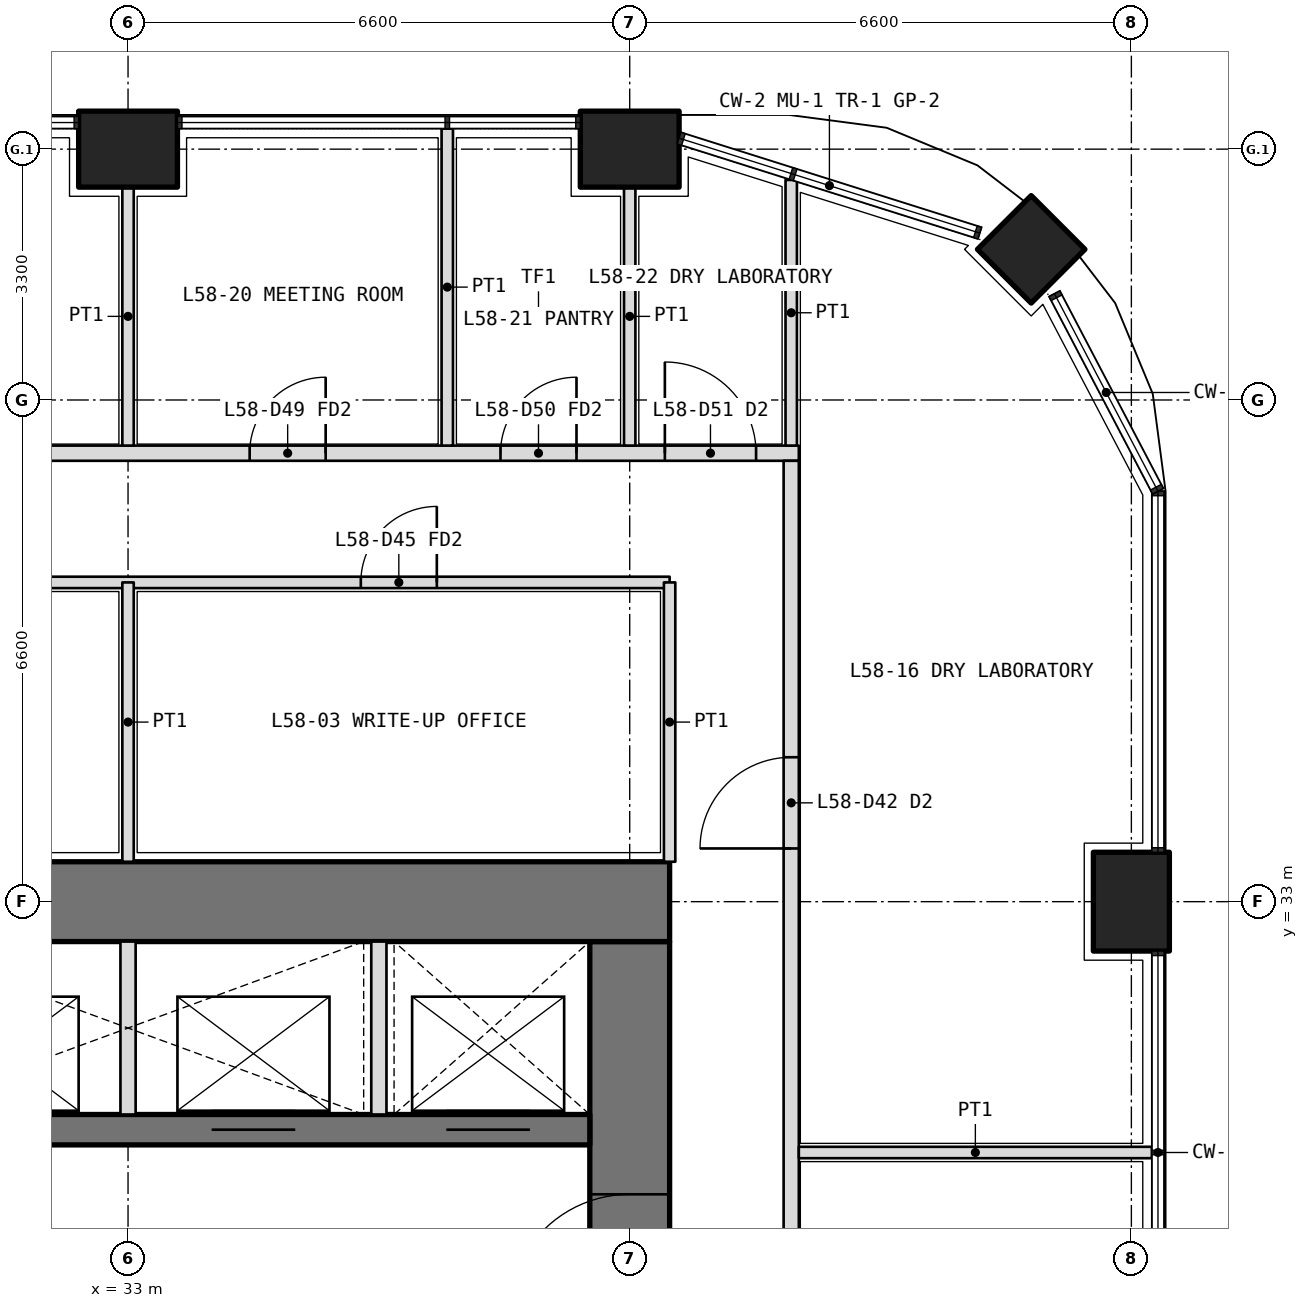
"""IFC4 building model, lengths in metres.
Left out: names, types, materials, properties, quantities, classifications, styles, units other than length and angle.
Written with IfcOpenShell. Run it as: python <this file> out.ifc"""

import sys

from ifc_helpers import new_model, si_unit, direction, frame, frame_2d, origin, origin_2d, place, context, subcontext, project, spatial, rectangle, extrude, element, fill, save


model = new_model("IFC4")
c1 = context("Model", 3, precision=1e-05, world=origin(), true_north=direction((0.0, 1.0)))
c2 = subcontext(c1, "Body", "Model", "MODEL_VIEW")
j1 = project(units=[si_unit("LENGTHUNIT", "METRE"), si_unit("PLANEANGLEUNIT", "RADIAN")], contexts=[c1])
p1 = place(None, origin())
s1 = spatial("IfcSite", under=j1, at=p1, CompositionType="ELEMENT")
p2 = place(p1, origin())
s2 = spatial("IfcBuilding", under=s1, at=p2, CompositionType="ELEMENT")
p3 = place(p2, frame((0.0, 0.0, 254.4)))
s3 = spatial("IfcBuildingStorey", under=s2, at=p3, CompositionType="ELEMENT", Elevation=254.4)
p4 = place(p3, frame((44.882, 41.582, 0.0), z_axis=(0.0, 0.0, 1.0), x_axis=(0.707106781187, 0.707106781187, 0.0)))
e1 = element("IfcColumn", 1, at=p4, inside=s3, PredefinedType="COLUMN", context=c2, shape_type="SweptSolid", body=[
    extrude(rectangle(XDim=1.0, YDim=1.0, at=origin_2d()), origin(), (0.0, 0.0, 1.0), 4.2),
])
for number, where, z_axis, x_axis in (
    (2, (46.2, 33.0, 0.0), (0.0, 0.0, 1.0), (0.0, 1.0, 0.0)),
    (3, (33.0, 42.9, 0.0), (0.0, 0.0, 1.0), (1.0, 0.0, 0.0)),
    (4, (39.6, 42.9, 0.0), (0.0, 0.0, 1.0), (1.0, 0.0, 0.0)),
):
    element("IfcColumn", number, at=place(p3, frame(where, z_axis=z_axis, x_axis=x_axis)), inside=s3, PredefinedType="COLUMN", context=c2, shape_type="SweptSolid", body=[
        extrude(rectangle(XDim=1.3, YDim=1.0, at=origin_2d()), origin(), (0.0, 0.0, 1.0), 4.2),
    ])
p5 = place(p3, frame((39.6, 13.725, 0.0), z_axis=(0.0, 0.0, 1.0), x_axis=(0.0, 1.0, 0.0)))
e5 = element("IfcWall", 5, at=p5, inside=s3, PredefinedType="SHEAR", context=c2, shape_type="SweptSolid", body=[
    extrude(rectangle(XDim=18.75, YDim=1.05, at=frame_2d((9.375, 0.0))), origin(), (0.0, 0.0, 1.0), 4.2),
])
p6 = place(p5, frame((3.025, 0.0, 0.0)))
e6 = element("IfcOpeningElement", 6, at=p6, cuts=e5, PredefinedType="OPENING", context=c2, shape_type="SweptSolid", body=[
    extrude(rectangle(XDim=1.6, YDim=2.1, at=frame_2d((0.8, 1.05))), frame((0.0, 0.535, 0.0), z_axis=(0.0, -1.0, 0.0), x_axis=(1.0, 0.0, 0.0)), (0.0, 0.0, 1.0), 1.07),
])
p7 = place(p5, frame((13.825, 0.0, 0.0)))
e7 = element("IfcOpeningElement", 7, at=p7, cuts=e5, PredefinedType="OPENING", context=c2, shape_type="SweptSolid", body=[
    extrude(rectangle(XDim=1.6, YDim=2.1, at=frame_2d((0.8, 1.05))), frame((0.0, 0.535, 0.0), z_axis=(0.0, -1.0, 0.0), x_axis=(1.0, 0.0, 0.0)), (0.0, 0.0, 1.0), 1.07),
])
p8 = place(p3, frame((40.125, 33.0, 0.0), z_axis=(0.0, 0.0, 1.0), x_axis=(-1.0, 0.0, 0.0)))
e8 = element("IfcWall", 8, at=p8, inside=s3, PredefinedType="SHEAR", context=c2, shape_type="SweptSolid", body=[
    extrude(rectangle(XDim=27.45, YDim=1.05, at=frame_2d((13.725, 0.0))), origin(), (0.0, 0.0, 1.0), 4.2),
])
p9 = place(p3, frame((13.725, 30.0, 0.0), z_axis=(0.0, 0.0, 1.0), x_axis=(1.0, 0.0, 0.0)))
e9 = element("IfcWall", 9, at=p9, inside=s3, PredefinedType="SHEAR", context=c2, shape_type="SweptSolid", body=[
    extrude(rectangle(XDim=25.35, YDim=0.4, at=frame_2d((12.675, 0.0))), origin(), (0.0, 0.0, 1.0), 4.2),
])
p10 = place(p9, frame((0.837, 0.0, 0.0)))
e10 = element("IfcOpeningElement", 10, at=p10, cuts=e9, PredefinedType="OPENING", context=c2, shape_type="SweptSolid", body=[
    extrude(rectangle(XDim=1.0, YDim=2.1, at=frame_2d((0.5, 1.05))), frame((0.0, 0.21, 0.0), z_axis=(0.0, -1.0, 0.0), x_axis=(1.0, 0.0, 0.0)), (0.0, 0.0, 1.0), 0.42),
])
p11 = place(p9, frame((3.925, 0.0, 0.0)))
e11 = element("IfcOpeningElement", 11, at=p11, cuts=e9, PredefinedType="OPENING", context=c2, shape_type="SweptSolid", body=[
    extrude(rectangle(XDim=1.0, YDim=2.1, at=frame_2d((0.5, 1.05))), frame((0.0, 0.21, 0.0), z_axis=(0.0, -1.0, 0.0), x_axis=(1.0, 0.0, 0.0)), (0.0, 0.0, 1.0), 0.42),
])
p12 = place(p9, frame((7.225, 0.0, 0.0)))
e12 = element("IfcOpeningElement", 12, at=p12, cuts=e9, PredefinedType="OPENING", context=c2, shape_type="SweptSolid", body=[
    extrude(rectangle(XDim=1.0, YDim=2.1, at=frame_2d((0.5, 1.05))), frame((0.0, 0.21, 0.0), z_axis=(0.0, -1.0, 0.0), x_axis=(1.0, 0.0, 0.0)), (0.0, 0.0, 1.0), 0.42),
])
p13 = place(p9, frame((10.525, 0.0, 0.0)))
e13 = element("IfcOpeningElement", 13, at=p13, cuts=e9, PredefinedType="OPENING", context=c2, shape_type="SweptSolid", body=[
    extrude(rectangle(XDim=1.0, YDim=2.1, at=frame_2d((0.5, 1.05))), frame((0.0, 0.21, 0.0), z_axis=(0.0, -1.0, 0.0), x_axis=(1.0, 0.0, 0.0)), (0.0, 0.0, 1.0), 0.42),
])
p14 = place(p9, frame((13.775, 0.0, 0.0)))
e14 = element("IfcOpeningElement", 14, at=p14, cuts=e9, PredefinedType="OPENING", context=c2, shape_type="SweptSolid", body=[
    extrude(rectangle(XDim=1.1, YDim=2.1, at=frame_2d((0.55, 1.05))), frame((0.0, 0.21, 0.0), z_axis=(0.0, -1.0, 0.0), x_axis=(1.0, 0.0, 0.0)), (0.0, 0.0, 1.0), 0.42),
])
p15 = place(p9, frame((17.075, 0.0, 0.0)))
e15 = element("IfcOpeningElement", 15, at=p15, cuts=e9, PredefinedType="OPENING", context=c2, shape_type="SweptSolid", body=[
    extrude(rectangle(XDim=1.1, YDim=2.1, at=frame_2d((0.55, 1.05))), frame((0.0, 0.21, 0.0), z_axis=(0.0, -1.0, 0.0), x_axis=(1.0, 0.0, 0.0)), (0.0, 0.0, 1.0), 0.42),
])
p16 = place(p9, frame((20.375, 0.0, 0.0)))
e16 = element("IfcOpeningElement", 16, at=p16, cuts=e9, PredefinedType="OPENING", context=c2, shape_type="SweptSolid", body=[
    extrude(rectangle(XDim=1.1, YDim=2.1, at=frame_2d((0.55, 1.05))), frame((0.0, 0.21, 0.0), z_axis=(0.0, -1.0, 0.0), x_axis=(1.0, 0.0, 0.0)), (0.0, 0.0, 1.0), 0.42),
])
p17 = place(p9, frame((23.462, 0.0, 0.0)))
e17 = element("IfcOpeningElement", 17, at=p17, cuts=e9, PredefinedType="OPENING", context=c2, shape_type="SweptSolid", body=[
    extrude(rectangle(XDim=1.1, YDim=2.1, at=frame_2d((0.55, 1.05))), frame((0.0, 0.21, 0.0), z_axis=(0.0, -1.0, 0.0), x_axis=(1.0, 0.0, 0.0)), (0.0, 0.0, 1.0), 0.42),
])
for number, where, z_axis, x_axis in (
    (18, (33.0, 30.2, 0.0), (0.0, 0.0, 1.0), (0.0, 1.0, 0.0)),
    (19, (36.3, 30.2, 0.0), (0.0, 0.0, 1.0), (0.0, 1.0, 0.0)),
):
    element("IfcWall", number, at=place(p3, frame(where, z_axis=z_axis, x_axis=x_axis)), inside=s3, PredefinedType="PARTITIONING", context=c2, shape_type="SweptSolid", body=[
        extrude(rectangle(XDim=2.275, YDim=0.2, at=frame_2d((1.138, 0.0))), origin(), (0.0, 0.0, 1.0), 4.2),
    ])
p18 = place(p3, frame((12.675, 37.2, 0.0), z_axis=(0.0, 0.0, 1.0), x_axis=(1.0, 0.0, 0.0)))
e20 = element("IfcWall", 20, at=p18, inside=s3, PredefinedType="PARTITIONING", context=c2, shape_type="SweptSolid", body=[
    extrude(rectangle(XDim=27.45, YDim=0.15, at=frame_2d((13.725, 0.0))), origin(), (0.0, 0.0, 1.0), 3.0),
])
p19 = place(p18, frame((3.062, 0.0, 0.0)))
e21 = element("IfcOpeningElement", 21, at=p19, cuts=e20, PredefinedType="OPENING", context=c2, shape_type="SweptSolid", body=[
    extrude(rectangle(XDim=1.0, YDim=2.1, at=frame_2d((0.5, 1.05))), frame((0.0, 0.085, 0.0), z_axis=(0.0, -1.0, 0.0), x_axis=(1.0, 0.0, 0.0)), (0.0, 0.0, 1.0), 0.17),
])
p20 = place(p18, frame((13.225, 0.0, 0.0)))
e22 = element("IfcOpeningElement", 22, at=p20, cuts=e20, PredefinedType="OPENING", context=c2, shape_type="SweptSolid", body=[
    extrude(rectangle(XDim=1.0, YDim=2.1, at=frame_2d((0.5, 1.05))), frame((0.0, 0.085, 0.0), z_axis=(0.0, -1.0, 0.0), x_axis=(1.0, 0.0, 0.0)), (0.0, 0.0, 1.0), 0.17),
])
p21 = place(p18, frame((23.387, 0.0, 0.0)))
e23 = element("IfcOpeningElement", 23, at=p21, cuts=e20, PredefinedType="OPENING", context=c2, shape_type="SweptSolid", body=[
    extrude(rectangle(XDim=1.0, YDim=2.1, at=frame_2d((0.5, 1.05))), frame((0.0, 0.085, 0.0), z_axis=(0.0, -1.0, 0.0), x_axis=(1.0, 0.0, 0.0)), (0.0, 0.0, 1.0), 0.17),
])
for number, where, z_axis, x_axis in (
    (24, (40.125, 33.525, 0.0), (0.0, 0.0, 1.0), (0.0, 1.0, 0.0)),
    (25, (33.0, 33.525, 0.0), (0.0, 0.0, 1.0), (0.0, 1.0, 0.0)),
):
    element("IfcWall", number, at=place(p3, frame(where, z_axis=z_axis, x_axis=x_axis)), inside=s3, PredefinedType="PARTITIONING", context=c2, shape_type="SweptSolid", body=[
        extrude(rectangle(XDim=3.675, YDim=0.15, at=frame_2d((1.837, 0.0))), origin(), (0.0, 0.0, 1.0), 3.0),
    ])
p22 = place(p3, frame((10.975, 38.9, 0.0), z_axis=(0.0, 0.0, 1.0), x_axis=(1.0, 0.0, 0.0)))
e26 = element("IfcWall", 26, at=p22, inside=s3, PredefinedType="PARTITIONING", context=c2, shape_type="SweptSolid", body=[
    extrude(rectangle(XDim=30.85, YDim=0.2, at=frame_2d((15.425, 0.0))), origin(), (0.0, 0.0, 1.0), 3.0),
])
p23 = place(p22, frame((2.312, 0.0, 0.0)))
e27 = element("IfcOpeningElement", 27, at=p23, cuts=e26, PredefinedType="OPENING", context=c2, shape_type="SweptSolid", body=[
    extrude(rectangle(XDim=1.0, YDim=2.1, at=frame_2d((0.5, 1.05))), frame((0.0, 0.11, 0.0), z_axis=(0.0, -1.0, 0.0), x_axis=(1.0, 0.0, 0.0)), (0.0, 0.0, 1.0), 0.22),
])
p24 = place(p22, frame((6.675, 0.0, 0.0)))
e28 = element("IfcOpeningElement", 28, at=p24, cuts=e26, PredefinedType="OPENING", context=c2, shape_type="SweptSolid", body=[
    extrude(rectangle(XDim=1.0, YDim=2.1, at=frame_2d((0.5, 1.05))), frame((0.0, 0.11, 0.0), z_axis=(0.0, -1.0, 0.0), x_axis=(1.0, 0.0, 0.0)), (0.0, 0.0, 1.0), 0.22),
])
p25 = place(p22, frame((14.925, 0.0, 0.0)))
e29 = element("IfcOpeningElement", 29, at=p25, cuts=e26, PredefinedType="OPENING", context=c2, shape_type="SweptSolid", body=[
    extrude(rectangle(XDim=1.0, YDim=2.1, at=frame_2d((0.5, 1.05))), frame((0.0, 0.11, 0.0), z_axis=(0.0, -1.0, 0.0), x_axis=(1.0, 0.0, 0.0)), (0.0, 0.0, 1.0), 0.22),
])
p26 = place(p22, frame((23.625, 0.0, 0.0)))
e30 = element("IfcOpeningElement", 30, at=p26, cuts=e26, PredefinedType="OPENING", context=c2, shape_type="SweptSolid", body=[
    extrude(rectangle(XDim=1.0, YDim=2.1, at=frame_2d((0.5, 1.05))), frame((0.0, 0.11, 0.0), z_axis=(0.0, -1.0, 0.0), x_axis=(1.0, 0.0, 0.0)), (0.0, 0.0, 1.0), 0.22),
])
p27 = place(p22, frame((26.925, 0.0, 0.0)))
e31 = element("IfcOpeningElement", 31, at=p27, cuts=e26, PredefinedType="OPENING", context=c2, shape_type="SweptSolid", body=[
    extrude(rectangle(XDim=1.0, YDim=2.1, at=frame_2d((0.5, 1.05))), frame((0.0, 0.11, 0.0), z_axis=(0.0, -1.0, 0.0), x_axis=(1.0, 0.0, 0.0)), (0.0, 0.0, 1.0), 0.22),
])
p28 = place(p22, frame((29.087, 0.0, 0.0)))
e32 = element("IfcOpeningElement", 32, at=p28, cuts=e26, PredefinedType="OPENING", context=c2, shape_type="SweptSolid", body=[
    extrude(rectangle(XDim=1.2, YDim=2.1, at=frame_2d((0.6, 1.05))), frame((0.0, 0.11, 0.0), z_axis=(0.0, -1.0, 0.0), x_axis=(1.0, 0.0, 0.0)), (0.0, 0.0, 1.0), 0.22),
])
p29 = place(p3, frame((41.725, 7.4, 0.0), z_axis=(0.0, 0.0, 1.0), x_axis=(0.0, 1.0, 0.0)))
e33 = element("IfcWall", 33, at=p29, inside=s3, PredefinedType="PARTITIONING", context=c2, shape_type="SweptSolid", body=[
    extrude(rectangle(XDim=31.4, YDim=0.2, at=frame_2d((15.7, 0.0))), origin(), (0.0, 0.0, 1.0), 3.0),
])
p30 = place(p29, frame((4.0, 0.0, 0.0)))
e34 = element("IfcOpeningElement", 34, at=p30, cuts=e33, PredefinedType="OPENING", context=c2, shape_type="SweptSolid", body=[
    extrude(rectangle(XDim=1.0, YDim=2.1, at=frame_2d((0.5, 1.05))), frame((0.0, 0.11, 0.0), z_axis=(0.0, -1.0, 0.0), x_axis=(1.0, 0.0, 0.0)), (0.0, 0.0, 1.0), 0.22),
])
p31 = place(p29, frame((10.25, 0.0, 0.0)))
e35 = element("IfcOpeningElement", 35, at=p31, cuts=e33, PredefinedType="OPENING", context=c2, shape_type="SweptSolid", body=[
    extrude(rectangle(XDim=1.0, YDim=2.1, at=frame_2d((0.5, 1.05))), frame((0.0, 0.11, 0.0), z_axis=(0.0, -1.0, 0.0), x_axis=(1.0, 0.0, 0.0)), (0.0, 0.0, 1.0), 0.22),
])
p32 = place(p29, frame((13.4, 0.0, 0.0)))
e36 = element("IfcOpeningElement", 36, at=p32, cuts=e33, PredefinedType="OPENING", context=c2, shape_type="SweptSolid", body=[
    extrude(rectangle(XDim=1.0, YDim=2.1, at=frame_2d((0.5, 1.05))), frame((0.0, 0.11, 0.0), z_axis=(0.0, -1.0, 0.0), x_axis=(1.0, 0.0, 0.0)), (0.0, 0.0, 1.0), 0.22),
])
p33 = place(p29, frame((16.75, 0.0, 0.0)))
e37 = element("IfcOpeningElement", 37, at=p33, cuts=e33, PredefinedType="OPENING", context=c2, shape_type="SweptSolid", body=[
    extrude(rectangle(XDim=0.9, YDim=2.1, at=frame_2d((0.45, 1.05))), frame((0.0, 0.11, 0.0), z_axis=(0.0, -1.0, 0.0), x_axis=(1.0, 0.0, 0.0)), (0.0, 0.0, 1.0), 0.22),
])
p34 = place(p29, frame((20.05, 0.0, 0.0)))
e38 = element("IfcOpeningElement", 38, at=p34, cuts=e33, PredefinedType="OPENING", context=c2, shape_type="SweptSolid", body=[
    extrude(rectangle(XDim=1.2, YDim=2.1, at=frame_2d((0.6, 1.05))), frame((0.0, 0.11, 0.0), z_axis=(0.0, -1.0, 0.0), x_axis=(1.0, 0.0, 0.0)), (0.0, 0.0, 1.0), 0.22),
])
p35 = place(p29, frame((26.3, 0.0, 0.0)))
e39 = element("IfcOpeningElement", 39, at=p35, cuts=e33, PredefinedType="OPENING", context=c2, shape_type="SweptSolid", body=[
    extrude(rectangle(XDim=1.2, YDim=2.1, at=frame_2d((0.6, 1.05))), frame((0.0, 0.11, 0.0), z_axis=(0.0, -1.0, 0.0), x_axis=(1.0, 0.0, 0.0)), (0.0, 0.0, 1.0), 0.22),
])
p36 = place(p3, frame((41.725, 42.495, 0.0), z_axis=(0.0, 0.0, 1.0), x_axis=(0.0, -1.0, 0.0)))
e40 = element("IfcWall", 40, at=p36, inside=s3, PredefinedType="PARTITIONING", context=c2, shape_type="SweptSolid", body=[
    extrude(rectangle(XDim=3.495, YDim=0.15, at=frame_2d((1.748, 0.0))), origin(), (0.0, 0.0, 1.0), 2.7),
])
p37 = place(p3, frame((46.47, 29.7, 0.0), z_axis=(0.0, 0.0, 1.0), x_axis=(-1.0, 0.0, 0.0)))
e41 = element("IfcWall", 41, at=p37, inside=s3, PredefinedType="PARTITIONING", context=c2, shape_type="SweptSolid", body=[
    extrude(rectangle(XDim=4.645, YDim=0.15, at=frame_2d((2.323, 0.0))), origin(), (0.0, 0.0, 1.0), 2.7),
])
p38 = place(p3, frame((37.2, 43.17, 0.0), z_axis=(0.0, 0.0, 1.0), x_axis=(0.0, -1.0, 0.0)))
e42 = element("IfcWall", 42, at=p38, inside=s3, PredefinedType="PARTITIONING", context=c2, shape_type="SweptSolid", body=[
    extrude(rectangle(XDim=4.17, YDim=0.15, at=frame_2d((2.085, 0.0))), origin(), (0.0, 0.0, 1.0), 2.7),
])
for number, where, z_axis, x_axis in (
    (43, (39.6, 42.4, 0.0), (0.0, 0.0, 1.0), (0.0, -1.0, 0.0)),
    (44, (33.0, 42.4, 0.0), (0.0, 0.0, 1.0), (0.0, -1.0, 0.0)),
):
    element("IfcWall", number, at=place(p3, frame(where, z_axis=z_axis, x_axis=x_axis)), inside=s3, PredefinedType="PARTITIONING", context=c2, shape_type="SweptSolid", body=[
        extrude(rectangle(XDim=3.4, YDim=0.15, at=frame_2d((1.7, 0.0))), origin(), (0.0, 0.0, 1.0), 3.0),
    ])
p39 = place(p21, origin())
e45 = element("IfcDoor", 45, at=p39, inside=s3, OperationType="SINGLE_SWING_RIGHT", PredefinedType="DOOR", context=c2, shape_type="SweptSolid", body=[
    extrude(rectangle(XDim=1.0, YDim=2.1, at=frame_2d((0.5, 1.05))), frame((0.0, 0.025, 0.0), z_axis=(0.0, -1.0, 0.0), x_axis=(1.0, 0.0, 0.0)), (0.0, 0.0, 1.0), 0.05),
])
fill(e23, e45)
p40 = place(p35, origin())
e46 = element("IfcDoor", 46, at=p40, inside=s3, OperationType="DOUBLE_DOOR_SINGLE_SWING", PredefinedType="DOOR", context=c2, shape_type="SweptSolid", body=[
    extrude(rectangle(XDim=1.2, YDim=2.1, at=frame_2d((0.6, 1.05))), frame((0.0, 0.025, 0.0), z_axis=(0.0, -1.0, 0.0), x_axis=(1.0, 0.0, 0.0)), (0.0, 0.0, 1.0), 0.05),
])
fill(e39, e46)
p41 = place(p26, origin())
e47 = element("IfcDoor", 47, at=p41, inside=s3, OperationType="SINGLE_SWING_RIGHT", PredefinedType="DOOR", context=c2, shape_type="SweptSolid", body=[
    extrude(rectangle(XDim=1.0, YDim=2.1, at=frame_2d((0.5, 1.05))), frame((0.0, 0.025, 0.0), z_axis=(0.0, -1.0, 0.0), x_axis=(1.0, 0.0, 0.0)), (0.0, 0.0, 1.0), 0.05),
])
fill(e30, e47)
p42 = place(p27, origin())
e48 = element("IfcDoor", 48, at=p42, inside=s3, OperationType="SINGLE_SWING_RIGHT", PredefinedType="DOOR", context=c2, shape_type="SweptSolid", body=[
    extrude(rectangle(XDim=1.0, YDim=2.1, at=frame_2d((0.5, 1.05))), frame((0.0, 0.025, 0.0), z_axis=(0.0, -1.0, 0.0), x_axis=(1.0, 0.0, 0.0)), (0.0, 0.0, 1.0), 0.05),
])
fill(e31, e48)
p43 = place(p28, origin())
e49 = element("IfcDoor", 49, at=p43, inside=s3, OperationType="DOUBLE_DOOR_SINGLE_SWING", PredefinedType="DOOR", context=c2, shape_type="SweptSolid", body=[
    extrude(rectangle(XDim=1.2, YDim=2.1, at=frame_2d((0.6, 1.05))), frame((0.0, 0.025, 0.0), z_axis=(0.0, -1.0, 0.0), x_axis=(1.0, 0.0, 0.0)), (0.0, 0.0, 1.0), 0.05),
])
fill(e32, e49)
p44 = place(p7, origin())
e50 = element("IfcDoor", 50, at=p44, inside=s3, OperationType="DOUBLE_DOOR_DOUBLE_SWING", PredefinedType="DOOR", context=c2, shape_type="SweptSolid", body=[
    extrude(rectangle(XDim=1.6, YDim=2.1, at=frame_2d((0.8, 1.05))), frame((0.0, 0.025, 0.0), z_axis=(0.0, -1.0, 0.0), x_axis=(1.0, 0.0, 0.0)), (0.0, 0.0, 1.0), 0.05),
])
fill(e7, e50)
p45 = place(p16, origin())
e51 = element("IfcDoor", 51, at=p45, inside=s3, OperationType="DOUBLE_DOOR_SLIDING", PredefinedType="DOOR", context=c2, shape_type="SweptSolid", body=[
    extrude(rectangle(XDim=1.1, YDim=2.1, at=frame_2d((0.55, 1.05))), frame((0.0, 0.025, 0.0), z_axis=(0.0, -1.0, 0.0), x_axis=(1.0, 0.0, 0.0)), (0.0, 0.0, 1.0), 0.05),
])
fill(e16, e51)
p46 = place(p17, origin())
e52 = element("IfcDoor", 52, at=p46, inside=s3, OperationType="DOUBLE_DOOR_SLIDING", PredefinedType="DOOR", context=c2, shape_type="SweptSolid", body=[
    extrude(rectangle(XDim=1.1, YDim=2.1, at=frame_2d((0.55, 1.05))), frame((0.0, 0.025, 0.0), z_axis=(0.0, -1.0, 0.0), x_axis=(1.0, 0.0, 0.0)), (0.0, 0.0, 1.0), 0.05),
])
fill(e17, e52)
save(model, sys.argv[1])
